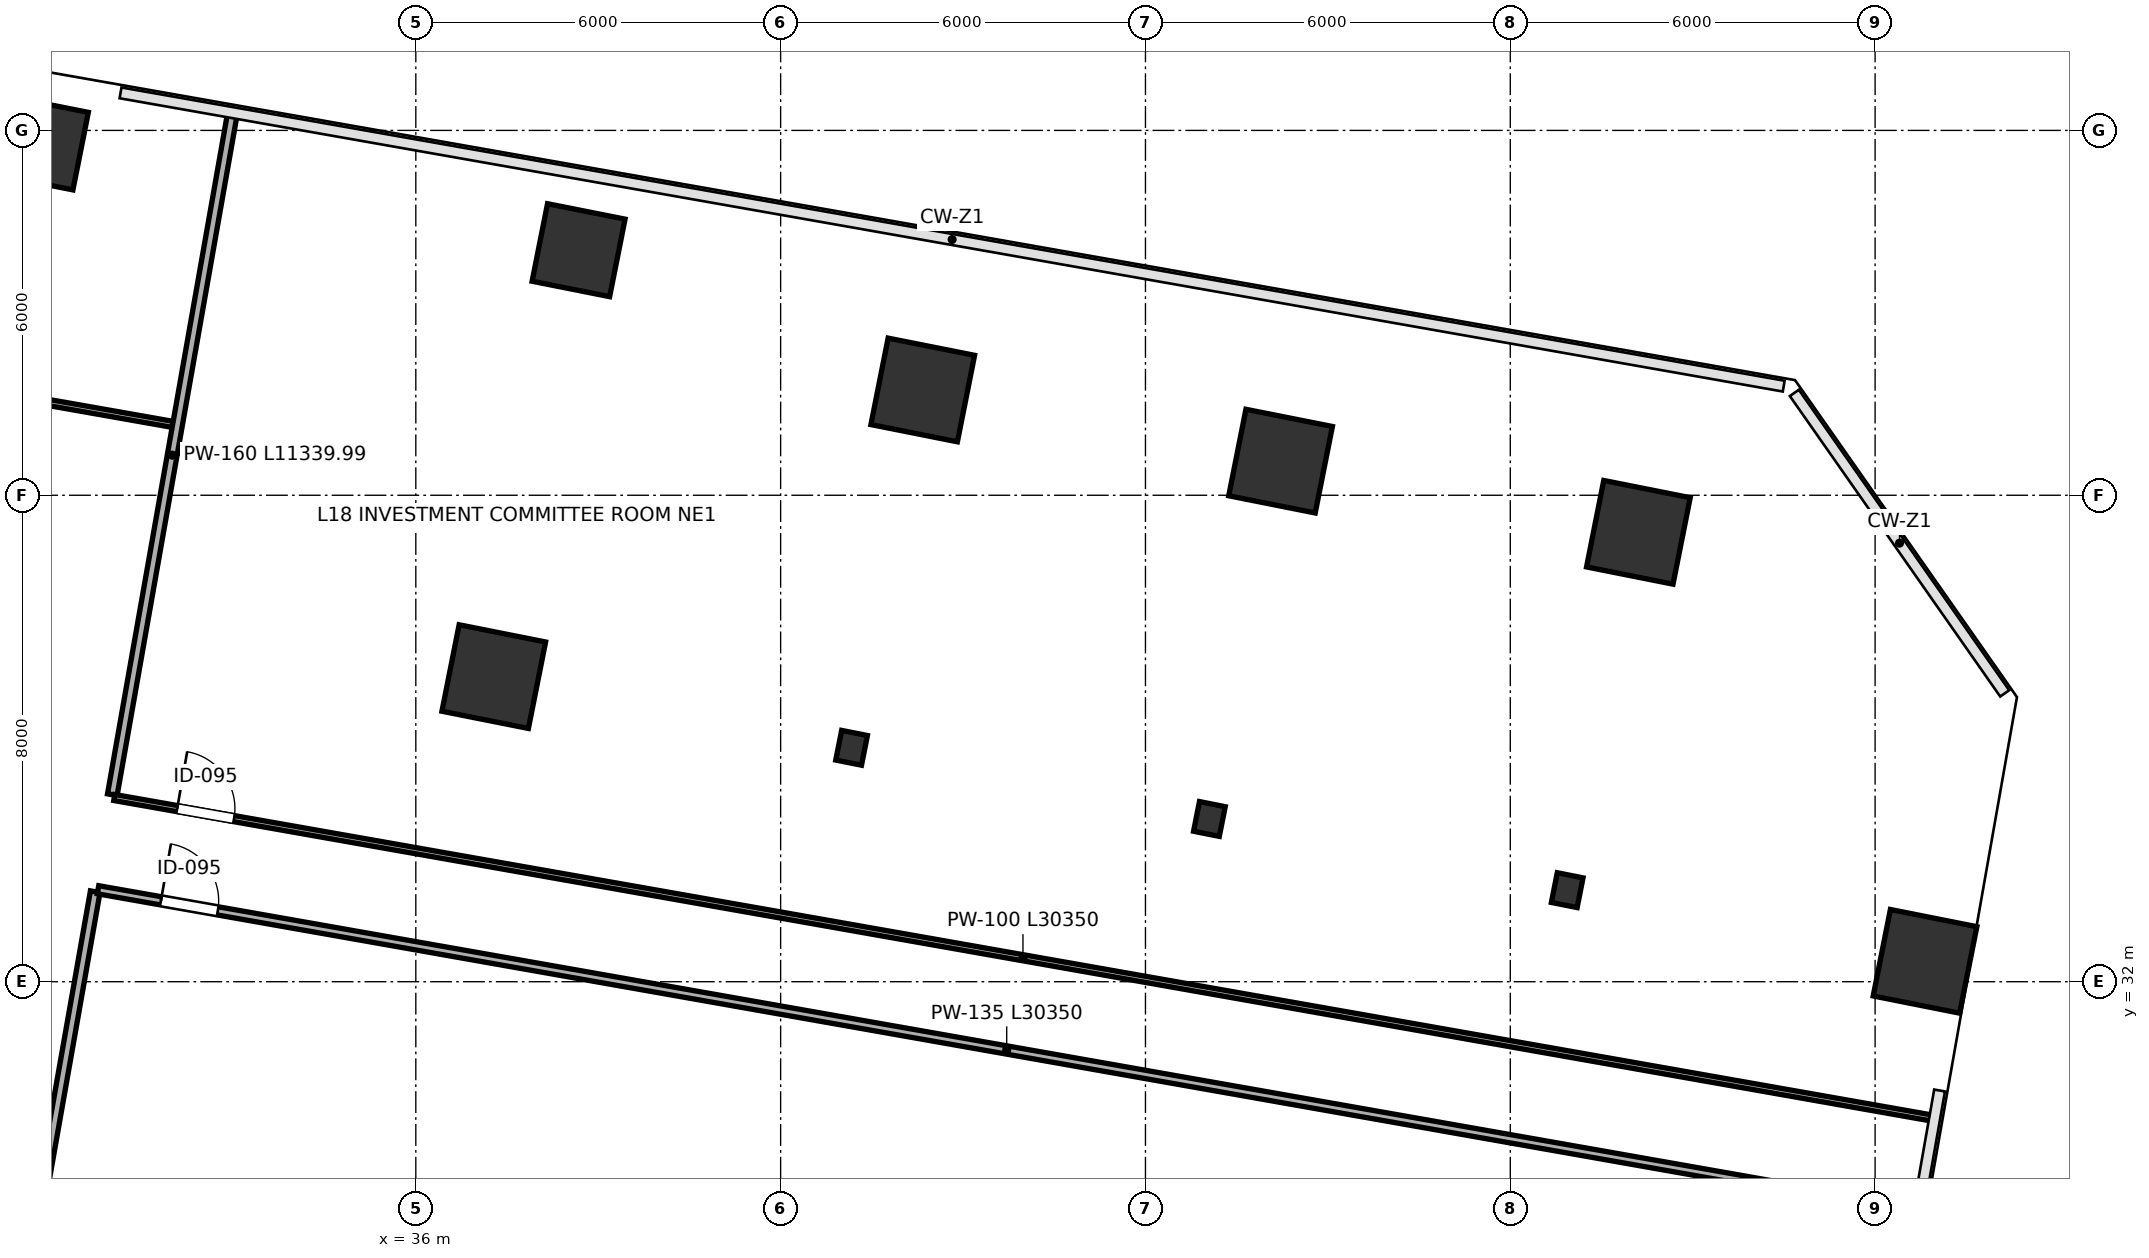
"""IFC4 building model, lengths in metres.
Left out: names, types, materials, properties, quantities, classifications, styles, units other than length and angle.
Written with IfcOpenShell. Run it as: python <this file> out.ifc"""

import sys

from ifc_helpers import new_model, si_unit, direction, frame, frame_2d, origin, origin_2d, place, context, subcontext, project, spatial, rectangle, i_section, extrude, clip, halfspace, source, transform, mapped, element, fill, save


model = new_model("IFC4")
c1 = context("Model", 3, precision=1e-05, world=origin(), true_north=direction((0.0, 1.0)))
c2 = subcontext(c1, "Body", "Model", "MODEL_VIEW")
j1 = project(units=[si_unit("LENGTHUNIT", "METRE"), si_unit("PLANEANGLEUNIT", "RADIAN")], contexts=[c1])
p1 = place(None, origin())
s1 = spatial("IfcSite", under=j1, at=p1, CompositionType="ELEMENT")
p2 = place(p1, origin())
s2 = spatial("IfcBuilding", under=s1, at=p2, CompositionType="ELEMENT")
p3 = place(p2, frame((0.0, 0.0, 83.2)))
s3 = spatial("IfcBuildingStorey", under=s2, at=p3, CompositionType="ELEMENT", Elevation=83.2)
p4 = place(p3, frame((29.85, 45.786, 0.0), z_axis=(0.070902338446, -0.043966401046, 0.996513830301), x_axis=(-0.682096199102, -0.731081301131, 0.016275942576)))
e1 = element("IfcColumn", 1, at=p4, inside=s3, PredefinedType="COLUMN", context=c2, shape_type="Clipping", body=[
    clip(clip(extrude(rectangle(XDim=1.3, YDim=1.3, at=origin_2d()), origin(), (0.0, 0.0, 1.0), 4.215), halfspace(frame((0.0, 0.0, 0.065), z_axis=(0.0, 0.0, -1.0), x_axis=(1.0, 0.0, 0.0)), False)), halfspace(frame((0.0, 0.0, 4.15), z_axis=(0.0, 0.0, 1.0), x_axis=(1.0, 0.0, 0.0)), False)),
])
p5 = place(p3, frame((37.282, 37.018, 0.0), z_axis=(0.025077424254, -0.08195047418, 0.996320853227), x_axis=(-0.994733136983, -0.101125877021, 0.016719544982)))
e2 = element("IfcColumn", 2, at=p5, inside=s3, PredefinedType="COLUMN", context=c2, shape_type="Clipping", body=[
    clip(clip(extrude(rectangle(XDim=1.45, YDim=1.45, at=origin_2d()), origin(), (0.0, 0.0, 1.0), 4.216), halfspace(frame((0.0, 0.0, 0.074), z_axis=(0.0, 0.0, -1.0), x_axis=(1.0, 0.0, 0.0)), False)), halfspace(frame((0.0, 0.0, 4.142), z_axis=(0.0, 0.0, 1.0), x_axis=(1.0, 0.0, 0.0)), False)),
])
p6 = place(p3, frame((38.677, 44.03, 0.0), z_axis=(0.061139454433, -0.089339883321, 0.994122906063), x_axis=(-0.91892960919, -0.393855710666, 0.021119955696)))
e3 = element("IfcColumn", 3, at=p6, inside=s3, PredefinedType="COLUMN", context=c2, shape_type="Clipping", body=[
    clip(clip(extrude(rectangle(XDim=1.3, YDim=1.3, at=origin_2d()), origin(), (0.0, 0.0, 1.0), 4.225), halfspace(frame((0.0, 0.0, 0.084), z_axis=(0.0, 0.0, -1.0), x_axis=(1.0, 0.0, 0.0)), False)), halfspace(frame((0.0, 0.0, 4.141), z_axis=(0.0, 0.0, 1.0), x_axis=(1.0, 0.0, 0.0)), False)),
])
p7 = place(p3, frame((43.167, 35.847, 0.0), z_axis=(0.018654286429, -0.112041224991, 0.993528450272), x_axis=(-0.999300711644, 0.030117508478, 0.022159047626)))
e4 = element("IfcColumn", 4, at=p7, inside=s3, PredefinedType="COLUMN", context=c2, shape_type="Clipping", body=[
    clip(clip(extrude(i_section(OverallWidth=0.432, OverallDepth=0.498, WebThickness=0.056, FlangeThickness=0.089, FilletRadius=0.015, at=origin_2d()), origin(), (0.0, 0.0, 1.0), 4.227), halfspace(frame((0.0, 0.0, 0.033), z_axis=(0.0, 0.0, -1.0), x_axis=(1.0, 0.0, 0.0)), False)), halfspace(frame((0.0, 0.0, 4.194), z_axis=(0.0, 0.0, 1.0), x_axis=(1.0, 0.0, 0.0)), False)),
])
p8 = place(p3, frame((44.337, 41.732, 0.0), z_axis=(0.048831372858, -0.118186911876, 0.991789973173), x_axis=(-0.9803469828, -0.195697234694, 0.024947658159)))
e5 = element("IfcColumn", 5, at=p8, inside=s3, PredefinedType="COLUMN", context=c2, shape_type="Clipping", body=[
    clip(clip(extrude(rectangle(XDim=1.45, YDim=1.45, at=origin_2d()), origin(), (0.0, 0.0, 1.0), 4.235), halfspace(frame((0.0, 0.0, 0.111), z_axis=(0.0, 0.0, -1.0), x_axis=(1.0, 0.0, 0.0)), False)), halfspace(frame((0.0, 0.0, 4.124), z_axis=(0.0, 0.0, 1.0), x_axis=(1.0, 0.0, 0.0)), False)),
])
p9 = place(p3, frame((49.052, 34.677, 0.0), z_axis=(0.012255457878, -0.141829594687, 0.98981522004), x_axis=(-0.993768135654, 0.107951703672, 0.027772688627)))
e6 = element("IfcColumn", 6, at=p9, inside=s3, PredefinedType="COLUMN", context=c2, shape_type="Clipping", body=[
    clip(clip(extrude(i_section(OverallWidth=0.432, OverallDepth=0.498, WebThickness=0.056, FlangeThickness=0.089, FilletRadius=0.015, at=origin_2d()), origin(), (0.0, 0.0, 1.0), 4.243), halfspace(frame((0.0, 0.0, 0.042), z_axis=(0.0, 0.0, -1.0), x_axis=(1.0, 0.0, 0.0)), False)), halfspace(frame((0.0, 0.0, 4.201), z_axis=(0.0, 0.0, 1.0), x_axis=(1.0, 0.0, 0.0)), False)),
])
p10 = place(p3, frame((50.222, 40.561, 0.0), z_axis=(0.042331730969, -0.14784514995, 0.988104162621), x_axis=(-0.995958791964, -0.084651957727, 0.0300021793)))
e7 = element("IfcColumn", 7, at=p10, inside=s3, PredefinedType="COLUMN", context=c2, shape_type="Clipping", body=[
    clip(clip(extrude(rectangle(XDim=1.45, YDim=1.45, at=origin_2d()), origin(), (0.0, 0.0, 1.0), 4.25), halfspace(frame((0.0, 0.0, 0.134), z_axis=(0.0, 0.0, -1.0), x_axis=(1.0, 0.0, 0.0)), False)), halfspace(frame((0.0, 0.0, 4.117), z_axis=(0.0, 0.0, 1.0), x_axis=(1.0, 0.0, 0.0)), False)),
])
p11 = place(p3, frame((54.936, 33.506, 0.0), z_axis=(0.005841578208, -0.171181149654, 0.985222254097), x_axis=(-0.98676998796, 0.158645559647, 0.033415225051)))
e8 = element("IfcColumn", 8, at=p11, inside=s3, PredefinedType="COLUMN", context=c2, shape_type="Clipping", body=[
    clip(clip(extrude(i_section(OverallWidth=0.432, OverallDepth=0.498, WebThickness=0.056, FlangeThickness=0.089, FilletRadius=0.015, at=origin_2d()), origin(), (0.0, 0.0, 1.0), 4.263), halfspace(frame((0.0, 0.0, 0.051), z_axis=(0.0, 0.0, -1.0), x_axis=(1.0, 0.0, 0.0)), False)), halfspace(frame((0.0, 0.0, 4.212), z_axis=(0.0, 0.0, 1.0), x_axis=(1.0, 0.0, 0.0)), False)),
])
p12 = place(p3, frame((56.107, 39.391, 0.0), z_axis=(0.035846347548, -0.177230745453, 0.983516294849), x_axis=(-0.999357313097, -0.00636826981, 0.035276137819)))
e9 = element("IfcColumn", 9, at=p12, inside=s3, PredefinedType="COLUMN", context=c2, shape_type="Clipping", body=[
    clip(clip(extrude(rectangle(XDim=1.45, YDim=1.45, at=origin_2d()), origin(), (0.0, 0.0, 1.0), 4.27), halfspace(frame((0.0, 0.0, 0.157), z_axis=(0.0, 0.0, -1.0), x_axis=(1.0, 0.0, 0.0)), False)), halfspace(frame((0.0, 0.0, 4.113), z_axis=(0.0, 0.0, 1.0), x_axis=(1.0, 0.0, 0.0)), False)),
])
p13 = place(p3, frame((60.821, 32.335, 0.0), z_axis=(-0.000512580103, -0.20013405349, 0.979768389924), x_axis=(-0.980292512005, 0.193654666945, 0.039044345)))
e10 = element("IfcColumn", 10, at=p13, inside=s3, PredefinedType="COLUMN", context=c2, shape_type="Clipping", body=[
    clip(clip(extrude(rectangle(XDim=1.45, YDim=1.45, at=origin_2d()), origin(), (0.0, 0.0, 1.0), 4.287), halfspace(frame((0.0, 0.0, 0.175), z_axis=(0.0, 0.0, -1.0), x_axis=(1.0, 0.0, 0.0)), False)), halfspace(frame((0.0, 0.0, 4.112), z_axis=(0.0, 0.0, 1.0), x_axis=(1.0, 0.0, 0.0)), False)),
])
p14 = place(p3, frame((6.83, 45.604, 0.0), z_axis=(0.0, 0.0, 1.0), x_axis=(0.984806496121, -0.173655305701, 0.0)))
e11 = element("IfcWall", 11, at=p14, inside=s3, PredefinedType="PARTITIONING", context=c2, shape_type="SweptSolid", body=[
    extrude(rectangle(XDim=25.6, YDim=0.1, at=frame_2d((12.8, 0.0))), origin(), (0.0, 0.0, 1.0), 3.96),
])
p15 = place(p14, frame((1.05, 0.0, 0.0)))
e12 = element("IfcOpeningElement", 12, at=p15, cuts=e11, PredefinedType="OPENING", context=c2, shape_type="SweptSolid", body=[
    extrude(rectangle(XDim=0.95, YDim=2.15, at=frame_2d((0.475, 1.075))), frame((0.0, 0.06, 0.0), z_axis=(0.0, -1.0, 0.0), x_axis=(1.0, 0.0, 0.0)), (0.0, 0.0, 1.0), 0.12),
])
p16 = place(p3, frame((31.009, 35.076, 0.0), z_axis=(0.0, 0.0, 1.0), x_axis=(0.173653918008, 0.984806740818, 0.0)))
e13 = element("IfcWall", 13, at=p16, inside=s3, PredefinedType="PARTITIONING", context=c2, shape_type="SweptSolid", body=[
    extrude(rectangle(XDim=11.34, YDim=0.16, at=frame_2d((5.67, 0.0))), origin(), (0.0, 0.0, 1.0), 3.095),
])
p17 = place(p3, frame((27.067, 12.72, 0.0), z_axis=(0.0, 0.0, 1.0), x_axis=(0.173654514703, 0.984806635601, 0.0)))
e14 = element("IfcWall", 14, at=p17, inside=s3, PredefinedType="PARTITIONING", context=c2, shape_type="SweptSolid", body=[
    extrude(rectangle(XDim=21.08, YDim=0.16, at=frame_2d((10.54, 0.0))), origin(), (0.0, 0.0, 1.0), 3.96),
])
p18 = place(p3, frame((31.041, 35.029, 0.0), z_axis=(0.0, 0.0, 1.0), x_axis=(0.984807519997, -0.173649499156, 0.0)))
e15 = element("IfcWall", 15, at=p18, inside=s3, PredefinedType="PARTITIONING", context=c2, shape_type="SweptSolid", body=[
    extrude(rectangle(XDim=30.35, YDim=0.1, at=frame_2d((15.175, 0.0))), origin(), (0.0, 0.0, 1.0), 3.095),
])
p19 = place(p18, frame((1.05, 0.0, 0.0)))
e16 = element("IfcOpeningElement", 16, at=p19, cuts=e15, PredefinedType="OPENING", context=c2, shape_type="SweptSolid", body=[
    extrude(rectangle(XDim=0.95, YDim=2.15, at=frame_2d((0.475, 1.075))), frame((0.0, 0.06, 0.0), z_axis=(0.0, -1.0, 0.0), x_axis=(1.0, 0.0, 0.0)), (0.0, 0.0, 1.0), 0.12),
])
p20 = place(p3, frame((30.774, 33.513, 0.0), z_axis=(0.0, 0.0, 1.0), x_axis=(0.984807519997, -0.173649499156, 0.0)))
e17 = element("IfcWall", 17, at=p20, inside=s3, PredefinedType="PARTITIONING", context=c2, shape_type="SweptSolid", body=[
    extrude(rectangle(XDim=30.35, YDim=0.135, at=frame_2d((15.175, 0.0))), origin(), (0.0, 0.0, 1.0), 3.095),
])
p21 = place(p20, frame((1.05, 0.0, 0.0)))
e18 = element("IfcOpeningElement", 18, at=p21, cuts=e17, PredefinedType="OPENING", context=c2, shape_type="SweptSolid", body=[
    extrude(rectangle(XDim=0.95, YDim=2.15, at=frame_2d((0.475, 1.075))), frame((0.0, 0.078, 0.0), z_axis=(0.0, -1.0, 0.0), x_axis=(1.0, 0.0, 0.0)), (0.0, 0.0, 1.0), 0.155),
])
m1 = source(origin(), c2, "Body", "SweptSolid", [
    extrude(rectangle(XDim=0.95, YDim=2.15, at=frame_2d((0.475, 1.075))), frame((0.0, 0.025, 0.0), z_axis=(0.0, -1.0, 0.0), x_axis=(1.0, 0.0, 0.0)), (0.0, 0.0, 1.0), 0.05),
])
p22 = place(p19, origin())
e19 = element("IfcDoor", 19, at=p22, inside=s3, OperationType="SINGLE_SWING_LEFT", PredefinedType="DOOR", context=c2, shape_type="MappedRepresentation", body=[
    mapped(m1, transform((0.0, 0.0, 0.0), scale=1.0)),
])
fill(e16, e19)
p23 = place(p21, origin())
e20 = element("IfcDoor", 20, at=p23, inside=s3, OperationType="SINGLE_SWING_LEFT", PredefinedType="DOOR", context=c2, shape_type="MappedRepresentation", body=[
    mapped(m1, transform((0.0, 0.0, 0.0), scale=1.0)),
])
fill(e18, e20)
save(model, sys.argv[1])
